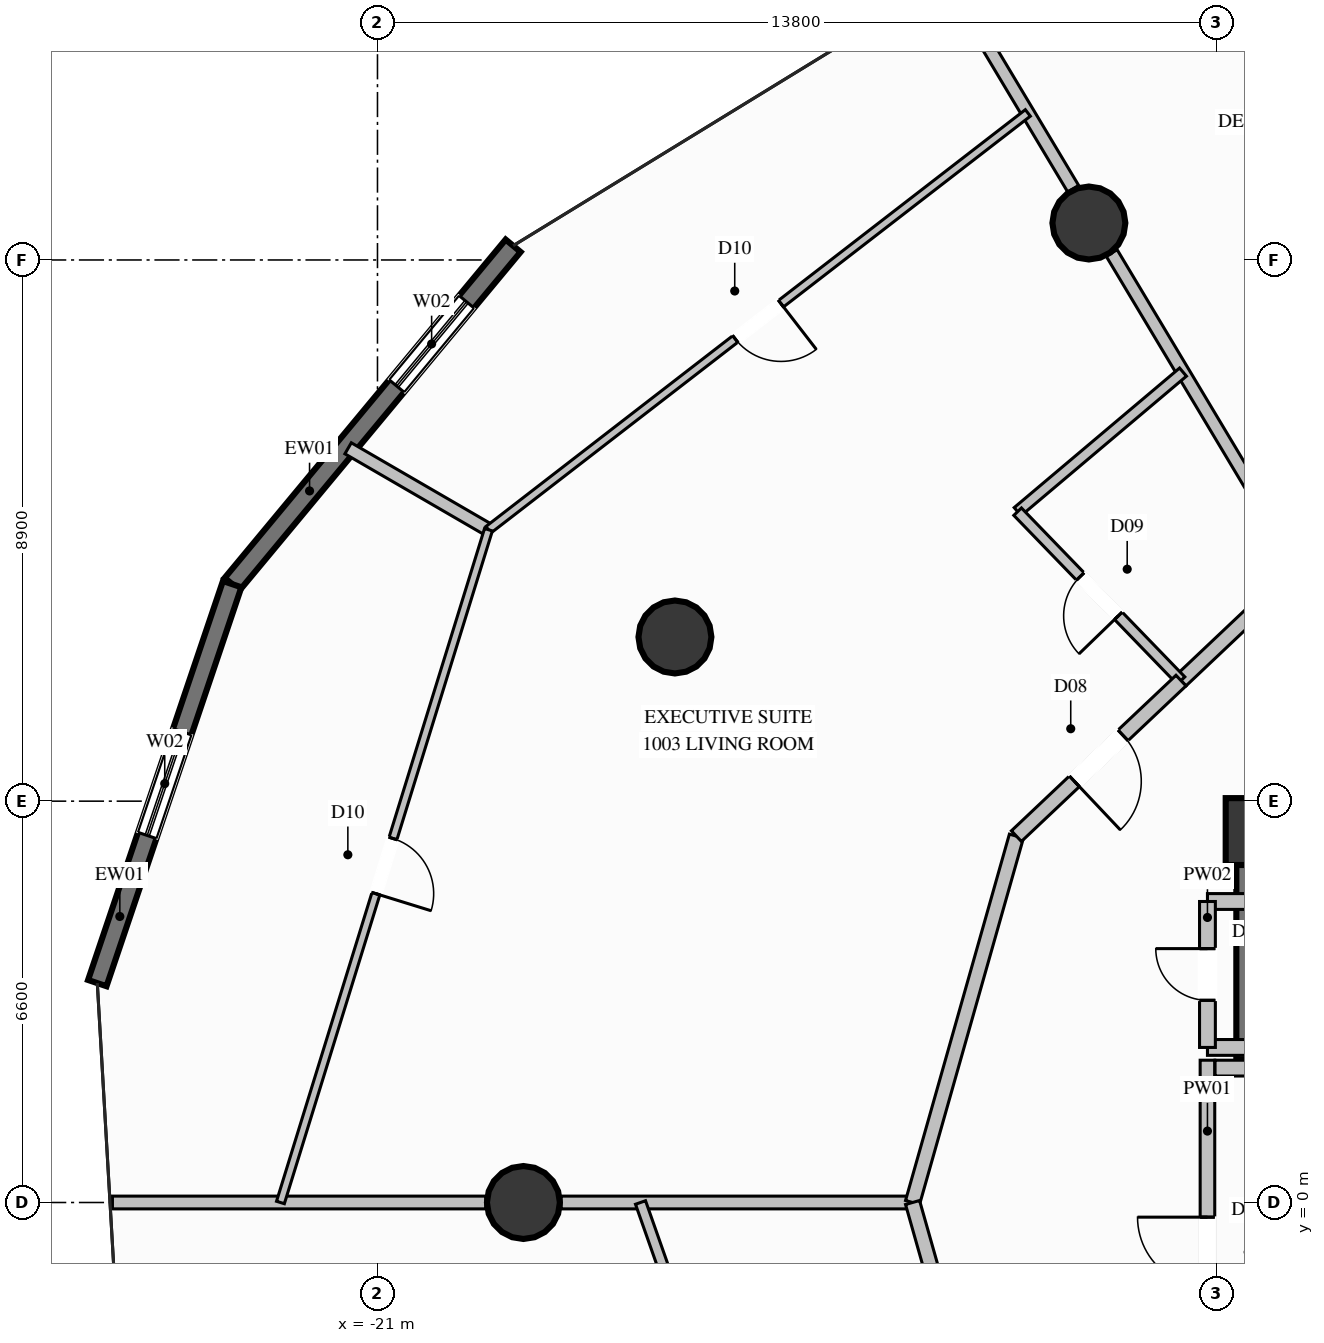
"""IFC4 building model, lengths in metres.
Left out: names, types, materials, properties, quantities, classifications, styles, units other than length and angle.
Written with IfcOpenShell. Run it as: python <this file> out.ifc"""

import sys

from ifc_helpers import new_model, si_unit, direction, frame, frame_2d, origin, origin_2d, place, context, subcontext, project, spatial, rectangle, circle, extrude, element, fill, save


model = new_model("IFC4")
c1 = context("Model", 3, precision=1e-05, world=origin(), true_north=direction((0.0, 1.0)))
c2 = subcontext(c1, "Body", "Model", "MODEL_VIEW")
j1 = project(units=[si_unit("LENGTHUNIT", "METRE"), si_unit("PLANEANGLEUNIT", "RADIAN")], contexts=[c1])
p1 = place(None, origin())
s1 = spatial("IfcSite", under=j1, at=p1, CompositionType="ELEMENT")
p2 = place(p1, origin())
s2 = spatial("IfcBuilding", under=s1, at=p2, CompositionType="ELEMENT")
p3 = place(p2, frame((0.0, 0.0, 39.2)))
s3 = spatial("IfcBuildingStorey", under=s2, at=p3, CompositionType="ELEMENT", Elevation=39.2)
p4 = place(p3, frame((-6.5, 6.1, 0.0), z_axis=(0.0, 0.0, 1.0), x_axis=(1.0, 0.0, 0.0)))
e1 = element("IfcColumn", 1, at=p4, inside=s3, PredefinedType="COLUMN", context=c2, shape_type="SweptSolid", body=[
    extrude(rectangle(XDim=1.1, YDim=1.1, at=origin_2d()), origin(), (0.0, 0.0, 1.0), 3.6),
])
p5 = place(p3, frame((-6.5, 2.35, 0.0), z_axis=(0.0, 0.0, 1.0), x_axis=(0.0, 1.0, 0.0)))
e2 = element("IfcWall", 2, at=p5, inside=s3, PredefinedType="SHEAR", context=c2, shape_type="SweptSolid", body=[
    extrude(rectangle(XDim=4.125, YDim=0.75, at=frame_2d((2.062, 0.0))), origin(), (0.0, 0.0, 1.0), 3.6),
])
for number, where, z_axis, x_axis in (
    (3, (-9.3, 16.108, 0.0), (0.0, 0.0, 1.0), (1.0, 0.0, 0.0)),
    (4, (-16.108, 9.3, 0.0), (0.0, 0.0, 1.0), (1.0, 0.0, 0.0)),
    (5, (-18.6, 0.0, 0.0), (0.0, 0.0, 1.0), (1.0, 0.0, 0.0)),
):
    element("IfcColumn", number, at=place(p3, frame(where, z_axis=z_axis, x_axis=x_axis)), inside=s3, PredefinedType="COLUMN", context=c2, shape_type="SweptSolid", body=[
        extrude(circle(Radius=0.6, at=origin_2d()), origin(), (0.0, 0.0, 1.0), 3.6),
    ])
p6 = place(p3, frame((-23.39, 10.169, 0.0), z_axis=(0.0, 0.0, 1.0), x_axis=(0.638828887918, 0.769348849327, 0.0)))
e6 = element("IfcWall", 6, at=p6, inside=s3, PredefinedType="SOLIDWALL", context=c2, shape_type="SweptSolid", body=[
    extrude(rectangle(XDim=7.233, YDim=0.32, at=frame_2d((3.617, 0.0))), origin(), (0.0, 0.0, 1.0), 3.34),
])
p7 = place(p6, frame((4.235, 0.0, 0.35)))
e7 = element("IfcOpeningElement", 7, at=p7, cuts=e6, PredefinedType="OPENING", context=c2, shape_type="SweptSolid", body=[
    extrude(rectangle(XDim=1.8, YDim=2.6, at=frame_2d((0.9, 1.3))), frame((0.0, 0.17, 0.0), z_axis=(0.0, -1.0, 0.0), x_axis=(1.0, 0.0, 0.0)), (0.0, 0.0, 1.0), 0.34),
])
p8 = place(p3, frame((-25.608, 3.608, 0.0), z_axis=(0.0, 0.0, 1.0), x_axis=(0.320254087544, 0.947331683948, 0.0)))
e8 = element("IfcWall", 8, at=p8, inside=s3, PredefinedType="SOLIDWALL", context=c2, shape_type="SweptSolid", body=[
    extrude(rectangle(XDim=6.926, YDim=0.32, at=frame_2d((3.463, 0.0))), origin(), (0.0, 0.0, 1.0), 3.34),
])
p9 = place(p8, frame((2.563, 0.0, 0.35)))
e9 = element("IfcOpeningElement", 9, at=p9, cuts=e8, PredefinedType="OPENING", context=c2, shape_type="SweptSolid", body=[
    extrude(rectangle(XDim=1.8, YDim=2.6, at=frame_2d((0.9, 1.3))), frame((0.0, 0.17, 0.0), z_axis=(0.0, -1.0, 0.0), x_axis=(1.0, 0.0, 0.0)), (0.0, 0.0, 1.0), 0.34),
])
p10 = place(p3, frame((-7.35, -2.78, 0.0), z_axis=(0.0, 0.0, 1.0), x_axis=(0.0, 1.0, 0.0)))
e10 = element("IfcWall", 10, at=p10, inside=s3, PredefinedType="PARTITIONING", context=c2, shape_type="SweptSolid", body=[
    extrude(rectangle(XDim=5.12, YDim=0.24, at=frame_2d((2.56, 0.0))), origin(), (0.0, 0.0, 1.0), 2.425),
])
p11 = place(p10, frame((1.389, 0.0, 0.0)))
e11 = element("IfcOpeningElement", 11, at=p11, cuts=e10, PredefinedType="OPENING", context=c2, shape_type="SweptSolid", body=[
    extrude(rectangle(XDim=1.15, YDim=2.2, at=frame_2d((0.575, 1.1))), frame((0.0, 0.13, 0.0), z_axis=(0.0, -1.0, 0.0), x_axis=(1.0, 0.0, 0.0)), (0.0, 0.0, 1.0), 0.26),
])
p12 = place(p3, frame((-7.225, 2.21, 0.0), z_axis=(0.0, 0.0, 1.0), x_axis=(1.0, 0.0, 0.0)))
e12 = element("IfcWall", 12, at=p12, inside=s3, PredefinedType="PARTITIONING", context=c2, shape_type="SweptSolid", body=[
    extrude(rectangle(XDim=0.875, YDim=0.26, at=frame_2d((0.438, 0.0))), origin(), (0.0, 0.0, 1.0), 3.34),
])
for number, where, z_axis, x_axis in (
    (13, (-7.35, 4.95, 0.0), (0.0, 0.0, 1.0), (1.0, 0.0, 0.0)),
    (14, (-7.35, 2.55, 0.0), (0.0, 0.0, 1.0), (1.0, 0.0, 0.0)),
):
    element("IfcWall", number, at=place(p3, frame(where, z_axis=z_axis, x_axis=x_axis)), inside=s3, PredefinedType="PARTITIONING", context=c2, shape_type="SweptSolid", body=[
        extrude(rectangle(XDim=0.93, YDim=0.26, at=frame_2d((0.465, 0.0))), origin(), (0.0, 0.0, 1.0), 3.34),
    ])
p13 = place(p3, frame((-7.35, 2.55, 0.0), z_axis=(0.0, 0.0, 1.0), x_axis=(0.0, 1.0, 0.0)))
e15 = element("IfcWall", 15, at=p13, inside=s3, PredefinedType="PARTITIONING", context=c2, shape_type="SweptSolid", body=[
    extrude(rectangle(XDim=2.4, YDim=0.26, at=frame_2d((1.2, 0.0))), origin(), (0.0, 0.0, 1.0), 2.425),
])
p14 = place(p13, frame((0.775, 0.0, 0.0)))
e16 = element("IfcOpeningElement", 16, at=p14, cuts=e15, PredefinedType="OPENING", context=c2, shape_type="SweptSolid", body=[
    extrude(rectangle(XDim=0.85, YDim=2.05, at=frame_2d((0.425, 1.025))), frame((0.0, 0.14, 0.0), z_axis=(0.0, -1.0, 0.0), x_axis=(1.0, 0.0, 0.0)), (0.0, 0.0, 1.0), 0.28),
])
p15 = place(p3, frame((-5.825, 10.436, 0.0), z_axis=(0.0, 0.0, 1.0), x_axis=(-0.51360919271, 0.858024240429, 0.0)))
e17 = element("IfcWall", 17, at=p15, inside=s3, PredefinedType="PARTITIONING", context=c2, shape_type="SweptSolid", body=[
    extrude(rectangle(XDim=6.036, YDim=0.21, at=frame_2d((3.018, 0.0))), origin(), (0.0, 0.0, 1.0), 2.709),
])
p16 = place(p3, frame((-9.558, 16.672, 0.0), z_axis=(0.0, 0.0, 1.0), x_axis=(-0.513495408949, 0.858092340595, 0.0)))
e18 = element("IfcWall", 18, at=p16, inside=s3, PredefinedType="PARTITIONING", context=c2, shape_type="SweptSolid", body=[
    extrude(rectangle(XDim=3.77, YDim=0.21, at=frame_2d((1.885, 0.0))), origin(), (0.0, 0.0, 1.0), 3.34),
])
p17 = place(p3, frame((-12.2, 0.0, 0.0), z_axis=(0.0, 0.0, 1.0), x_axis=(-1.0, 0.0, 0.0)))
e19 = element("IfcWall", 19, at=p17, inside=s3, PredefinedType="PARTITIONING", context=c2, shape_type="SweptSolid", body=[
    extrude(rectangle(XDim=5.78, YDim=0.21, at=frame_2d((2.89, 0.0))), origin(), (0.0, 0.0, 1.0), 2.709),
])
p18 = place(p3, frame((-19.22, 0.0, 0.0), z_axis=(0.0, 0.0, 1.0), x_axis=(-1.0, 0.0, 0.0)))
e20 = element("IfcWall", 20, at=p18, inside=s3, PredefinedType="PARTITIONING", context=c2, shape_type="SweptSolid", body=[
    extrude(rectangle(XDim=6.139, YDim=0.21, at=frame_2d((3.069, 0.0))), origin(), (0.0, 0.0, 1.0), 3.34),
])
p19 = place(p3, frame((-5.825, 10.436, 0.0), z_axis=(0.0, 0.0, 1.0), x_axis=(-0.726651583854, -0.687006168591, 0.0)))
e21 = element("IfcWall", 21, at=p19, inside=s3, PredefinedType="PARTITIONING", context=c2, shape_type="SweptSolid", body=[
    extrude(rectangle(XDim=2.697, YDim=0.24, at=frame_2d((1.349, 0.0))), origin(), (0.0, 0.0, 1.0), 3.34),
])
p20 = place(p3, frame((-7.752, 13.656, 0.0), z_axis=(0.0, 0.0, 1.0), x_axis=(-0.764298879833, -0.644862173093, 0.0)))
e22 = element("IfcWall", 22, at=p20, inside=s3, PredefinedType="PLUMBINGWALL", context=c2, shape_type="SweptSolid", body=[
    extrude(rectangle(XDim=3.559, YDim=0.175, at=frame_2d((1.779, 0.0))), origin(), (0.0, 0.0, 1.0), 3.34),
])
p21 = place(p3, frame((-7.785, 8.583, 0.0), z_axis=(0.0, 0.0, 1.0), x_axis=(-0.695227790949, 0.718789481484, 0.0)))
e23 = element("IfcWall", 23, at=p21, inside=s3, PredefinedType="PLUMBINGWALL", context=c2, shape_type="SweptSolid", body=[
    extrude(rectangle(XDim=3.865, YDim=0.175, at=frame_2d((1.933, 0.0))), origin(), (0.0, 0.0, 1.0), 3.34),
])
p22 = place(p21, frame((1.482, 0.0, 0.0)))
e24 = element("IfcOpeningElement", 24, at=p22, cuts=e23, PredefinedType="OPENING", context=c2, shape_type="SweptSolid", body=[
    extrude(rectangle(XDim=0.9, YDim=2.1, at=frame_2d((0.45, 1.05))), frame((0.0, 0.098, 0.0), z_axis=(0.0, -1.0, 0.0), x_axis=(1.0, 0.0, 0.0)), (0.0, 0.0, 1.0), 0.195),
])
p23 = place(p3, frame((-19.175, 11.064, 0.0), z_axis=(0.0, 0.0, 1.0), x_axis=(-0.864941429029, 0.501872816907, 0.0)))
e25 = element("IfcWall", 25, at=p23, inside=s3, PredefinedType="PARTITIONING", context=c2, shape_type="SweptSolid", body=[
    extrude(rectangle(XDim=2.668, YDim=0.21, at=frame_2d((1.334, 0.0))), origin(), (0.0, 0.0, 1.0), 3.34),
])
p24 = place(p3, frame((-10.492, 6.025, 0.0), z_axis=(0.0, 0.0, 1.0), x_axis=(-0.272743314702, -0.962086838225, 0.0)))
e26 = element("IfcWall", 26, at=p24, inside=s3, PredefinedType="PARTITIONING", context=c2, shape_type="SweptSolid", body=[
    extrude(rectangle(XDim=6.262, YDim=0.24, at=frame_2d((3.131, 0.0))), origin(), (0.0, 0.0, 1.0), 3.34),
])
p25 = place(p3, frame((-7.785, 8.583, 0.0), z_axis=(0.0, 0.0, 1.0), x_axis=(-0.726816794063, -0.686831382413, 0.0)))
e27 = element("IfcWall", 27, at=p25, inside=s3, PredefinedType="PARTITIONING", context=c2, shape_type="SweptSolid", body=[
    extrude(rectangle(XDim=3.725, YDim=0.24, at=frame_2d((1.862, 0.0))), origin(), (0.0, 0.0, 1.0), 3.34),
])
p26 = place(p25, frame((1.312, 0.0, 0.0)))
e28 = element("IfcOpeningElement", 28, at=p26, cuts=e27, PredefinedType="OPENING", context=c2, shape_type="SweptSolid", body=[
    extrude(rectangle(XDim=1.1, YDim=2.3, at=frame_2d((0.55, 1.15))), frame((0.0, 0.13, 0.0), z_axis=(0.0, -1.0, 0.0), x_axis=(1.0, 0.0, 0.0)), (0.0, 0.0, 1.0), 0.26),
])
p27 = place(p3, frame((-10.304, 17.918, 0.0), z_axis=(0.0, 0.0, 1.0), x_axis=(-0.791325231215, -0.611395435412, 0.0)))
e29 = element("IfcWall", 29, at=p27, inside=s3, PredefinedType="PARTITIONING", context=c2, shape_type="SweptSolid", body=[
    extrude(rectangle(XDim=11.21, YDim=0.135, at=frame_2d((5.605, 0.0))), origin(), (0.0, 0.0, 1.0), 3.34),
])
p28 = place(p27, frame((5.13, 0.0, 0.0)))
e30 = element("IfcOpeningElement", 30, at=p28, cuts=e29, PredefinedType="OPENING", context=c2, shape_type="SweptSolid", body=[
    extrude(rectangle(XDim=0.95, YDim=2.1, at=frame_2d((0.475, 1.05))), frame((0.0, 0.078, 0.0), z_axis=(0.0, -1.0, 0.0), x_axis=(1.0, 0.0, 0.0)), (0.0, 0.0, 1.0), 0.155),
])
p29 = place(p3, frame((-19.175, 11.064, 0.0), z_axis=(0.0, 0.0, 1.0), x_axis=(-0.295395137922, -0.955375168451, 0.0)))
e31 = element("IfcWall", 31, at=p29, inside=s3, PredefinedType="PARTITIONING", context=c2, shape_type="SweptSolid", body=[
    extrude(rectangle(XDim=11.581, YDim=0.135, at=frame_2d((5.791, 0.0))), origin(), (0.0, 0.0, 1.0), 3.34),
])
p30 = place(p29, frame((5.315, 0.0, 0.0)))
e32 = element("IfcOpeningElement", 32, at=p30, cuts=e31, PredefinedType="OPENING", context=c2, shape_type="SweptSolid", body=[
    extrude(rectangle(XDim=0.95, YDim=2.1, at=frame_2d((0.475, 1.05))), frame((0.0, 0.078, 0.0), z_axis=(0.0, -1.0, 0.0), x_axis=(1.0, 0.0, 0.0)), (0.0, 0.0, 1.0), 0.155),
])
p31 = place(p3, frame((-12.2, 0.0, 0.0), z_axis=(0.0, 0.0, 1.0), x_axis=(0.272672757197, -0.962106837873, 0.0)))
e33 = element("IfcWall", 33, at=p31, inside=s3, PredefinedType="PARTITIONING", context=c2, shape_type="SweptSolid", body=[
    extrude(rectangle(XDim=2.63, YDim=0.24, at=frame_2d((1.315, 0.0))), origin(), (0.0, 0.0, 1.0), 3.34),
])
p32 = place(p3, frame((-16.674, 0.0, 0.0), z_axis=(0.0, 0.0, 1.0), x_axis=(0.332094128013, -0.94324625106, 0.0)))
e34 = element("IfcWall", 34, at=p32, inside=s3, PredefinedType="PLUMBINGWALL", context=c2, shape_type="SweptSolid", body=[
    extrude(rectangle(XDim=3.554, YDim=0.175, at=frame_2d((1.777, 0.0))), origin(), (0.0, 0.0, 1.0), 3.34),
])
p33 = place(p7, origin())
e35 = element("IfcWindow", 35, at=p33, inside=s3, PartitioningType="SINGLE_PANEL", PredefinedType="WINDOW", context=c2, shape_type="SweptSolid", body=[
    extrude(rectangle(XDim=1.8, YDim=2.6, at=frame_2d((0.9, 1.3))), frame((0.0, 0.03, 0.0), z_axis=(0.0, -1.0, 0.0), x_axis=(1.0, 0.0, 0.0)), (0.0, 0.0, 1.0), 0.06),
])
fill(e7, e35)
p34 = place(p9, origin())
e36 = element("IfcWindow", 36, at=p34, inside=s3, PartitioningType="SINGLE_PANEL", PredefinedType="WINDOW", context=c2, shape_type="SweptSolid", body=[
    extrude(rectangle(XDim=1.8, YDim=2.6, at=frame_2d((0.9, 1.3))), frame((0.0, 0.03, 0.0), z_axis=(0.0, -1.0, 0.0), x_axis=(1.0, 0.0, 0.0)), (0.0, 0.0, 1.0), 0.06),
])
fill(e9, e36)
p35 = place(p11, origin())
e37 = element("IfcDoor", 37, at=p35, inside=s3, OperationType="SINGLE_SWING_RIGHT", PredefinedType="DOOR", context=c2, shape_type="SweptSolid", body=[
    extrude(rectangle(XDim=1.15, YDim=2.2, at=frame_2d((0.575, 1.1))), frame((0.0, 0.025, 0.0), z_axis=(0.0, -1.0, 0.0), x_axis=(1.0, 0.0, 0.0)), (0.0, 0.0, 1.0), 0.05),
])
fill(e11, e37)
p36 = place(p14, origin())
e38 = element("IfcDoor", 38, at=p36, inside=s3, OperationType="SINGLE_SWING_RIGHT", PredefinedType="DOOR", context=c2, shape_type="SweptSolid", body=[
    extrude(rectangle(XDim=0.85, YDim=2.05, at=frame_2d((0.425, 1.025))), frame((0.0, 0.025, 0.0), z_axis=(0.0, -1.0, 0.0), x_axis=(1.0, 0.0, 0.0)), (0.0, 0.0, 1.0), 0.05),
])
fill(e16, e38)
p37 = place(p22, origin())
e39 = element("IfcDoor", 39, at=p37, inside=s3, OperationType="SINGLE_SWING_LEFT", PredefinedType="DOOR", context=c2, shape_type="SweptSolid", body=[
    extrude(rectangle(XDim=0.9, YDim=2.1, at=frame_2d((0.45, 1.05))), frame((0.0, 0.025, 0.0), z_axis=(0.0, -1.0, 0.0), x_axis=(1.0, 0.0, 0.0)), (0.0, 0.0, 1.0), 0.05),
])
fill(e24, e39)
p38 = place(p26, origin())
e40 = element("IfcDoor", 40, at=p38, inside=s3, OperationType="SINGLE_SWING_RIGHT", PredefinedType="DOOR", context=c2, shape_type="SweptSolid", body=[
    extrude(rectangle(XDim=1.1, YDim=2.3, at=frame_2d((0.55, 1.15))), frame((0.0, 0.025, 0.0), z_axis=(0.0, -1.0, 0.0), x_axis=(1.0, 0.0, 0.0)), (0.0, 0.0, 1.0), 0.05),
])
fill(e28, e40)
p39 = place(p28, origin())
e41 = element("IfcDoor", 41, at=p39, inside=s3, OperationType="SINGLE_SWING_LEFT", PredefinedType="DOOR", context=c2, shape_type="SweptSolid", body=[
    extrude(rectangle(XDim=0.95, YDim=2.1, at=frame_2d((0.475, 1.05))), frame((0.0, 0.025, 0.0), z_axis=(0.0, -1.0, 0.0), x_axis=(1.0, 0.0, 0.0)), (0.0, 0.0, 1.0), 0.05),
])
fill(e30, e41)
p40 = place(p30, origin())
e42 = element("IfcDoor", 42, at=p40, inside=s3, OperationType="SINGLE_SWING_RIGHT", PredefinedType="DOOR", context=c2, shape_type="SweptSolid", body=[
    extrude(rectangle(XDim=0.95, YDim=2.1, at=frame_2d((0.475, 1.05))), frame((0.0, 0.025, 0.0), z_axis=(0.0, -1.0, 0.0), x_axis=(1.0, 0.0, 0.0)), (0.0, 0.0, 1.0), 0.05),
])
fill(e32, e42)
save(model, sys.argv[1])
